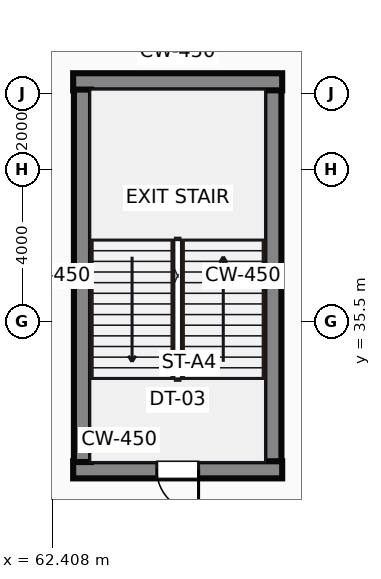
"""IFC4 building model, lengths in metres.
Left out: names, types, materials, properties, quantities, classifications, styles, units other than length and angle.
Written with IfcOpenShell. Run it as: python <this file> out.ifc"""

import sys

from ifc_helpers import new_model, si_unit, direction, frame, frame_2d, origin, place, context, subcontext, project, spatial, rectangle, extrude, source, transform, mapped, element, fill, save


model = new_model("IFC4")
c1 = context("Model", 3, precision=1e-05, world=origin(), true_north=direction((0.0, 1.0)))
c2 = subcontext(c1, "Body", "Model", "MODEL_VIEW")
j1 = project(units=[si_unit("LENGTHUNIT", "METRE"), si_unit("PLANEANGLEUNIT", "RADIAN")], contexts=[c1])
p1 = place(None, origin())
s1 = spatial("IfcSite", under=j1, at=p1, CompositionType="ELEMENT")
p2 = place(p1, origin())
s2 = spatial("IfcBuilding", under=s1, at=p2, CompositionType="ELEMENT")
p3 = place(p2, frame((0.0, 0.0, 16.0)))
s3 = spatial("IfcBuildingStorey", under=s2, at=p3, CompositionType="ELEMENT", Elevation=16.0)
m1 = source(origin(), c2, "Body", "SweptSolid", [
    extrude(rectangle(XDim=5.5, YDim=0.45, at=frame_2d((2.75, 0.0))), origin(), (0.0, 0.0, 1.0), 5.0),
])
p4 = place(p3, frame((62.95, 31.595, 0.0), z_axis=(0.0, 0.0, 1.0), x_axis=(1.0, 0.0, 0.0)))
e1 = element("IfcWall", 1, at=p4, inside=s3, PredefinedType="SHEAR", context=c2, shape_type="MappedRepresentation", body=[
    mapped(m1, transform((0.0, 0.0, 0.0))),
])
p5 = place(p4, frame((2.2, 0.0, 0.0)))
e2 = element("IfcOpeningElement", 2, at=p5, cuts=e1, PredefinedType="OPENING", context=c2, shape_type="SweptSolid", body=[
    extrude(rectangle(XDim=1.1, YDim=2.15, at=frame_2d((0.55, 1.075))), frame((0.0, 0.235, 0.0), z_axis=(0.0, -1.0, 0.0), x_axis=(1.0, 0.0, 0.0)), (0.0, 0.0, 1.0), 0.47),
])
m2 = source(origin(), c2, "Body", "SweptSolid", [
    extrude(rectangle(XDim=9.8, YDim=0.45, at=frame_2d((4.9, 0.0))), origin(), (0.0, 0.0, 1.0), 5.0),
])
for number, where, z_axis, x_axis in (
    (3, (63.195, 31.8, 0.0), (0.0, 0.0, 1.0), (0.0, 1.0, 0.0)),
    (4, (68.205, 31.8, 0.0), (0.0, 0.0, 1.0), (0.0, 1.0, 0.0)),
):
    element("IfcWall", number, at=place(p3, frame(where, z_axis=z_axis, x_axis=x_axis)), inside=s3, PredefinedType="SHEAR", context=c2, shape_type="MappedRepresentation", body=[
        mapped(m2, transform((0.0, 0.0, 0.0))),
    ])
p6 = place(p3, frame((62.95, 41.805, 0.0), z_axis=(0.0, 0.0, 1.0), x_axis=(1.0, 0.0, 0.0)))
e5 = element("IfcWall", 5, at=p6, inside=s3, PredefinedType="SHEAR", context=c2, shape_type="MappedRepresentation", body=[
    mapped(m1, transform((0.0, 0.0, 0.0))),
])
m3 = source(origin(), c2, "Body", "SweptSolid", [
    extrude(rectangle(XDim=1.1, YDim=2.15, at=frame_2d((0.55, 1.075))), frame((0.0, 0.025, 0.0), z_axis=(0.0, -1.0, 0.0), x_axis=(1.0, 0.0, 0.0)), (0.0, 0.0, 1.0), 0.05),
])
p7 = place(p5, origin())
e6 = element("IfcDoor", 6, at=p7, inside=s3, OperationType="SINGLE_SWING_RIGHT", PredefinedType="DOOR", context=c2, shape_type="MappedRepresentation", body=[
    mapped(m3, transform((0.0, 0.0, 0.0))),
])
fill(e2, e6)
save(model, sys.argv[1])
